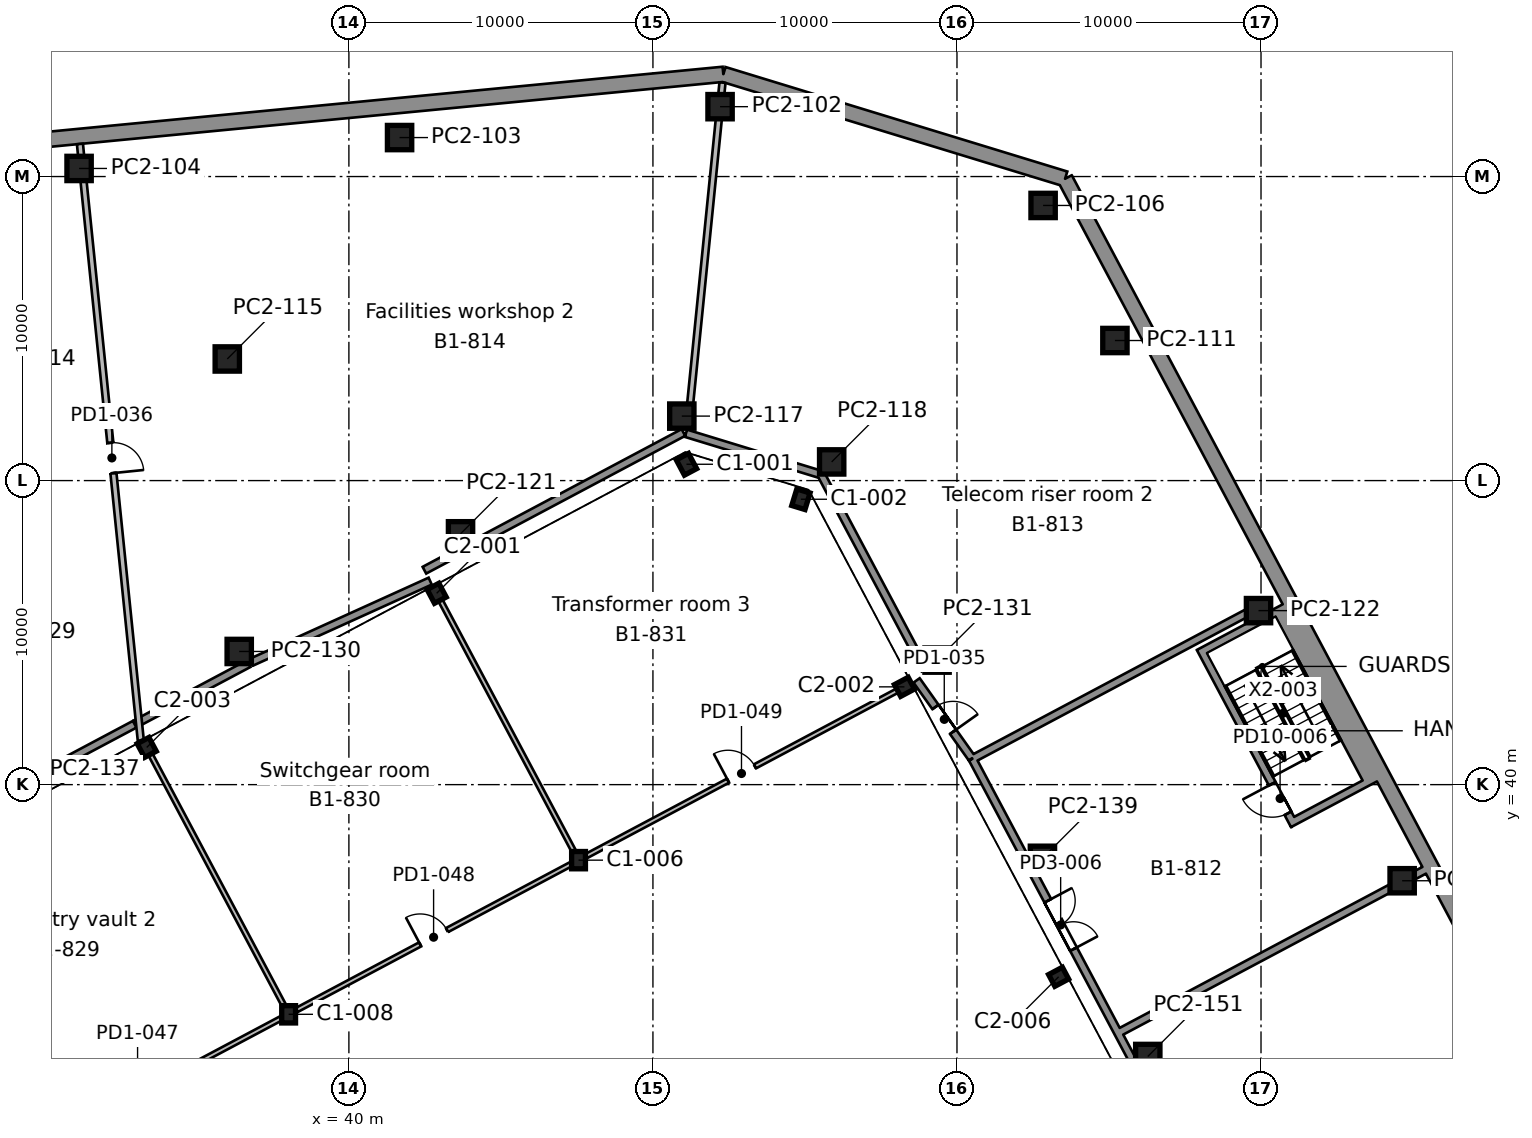
"""IFC4 building model, lengths in metres.
Left out: names, types, materials, properties, quantities, classifications, styles, units other than length and angle.
Written with IfcOpenShell. Run it as: python <this file> out.ifc"""

import sys

from ifc_helpers import new_model, si_unit, direction, frame, frame_2d, origin, origin_2d, place, context, subcontext, project, spatial, rectangle, i_section, extrude, element, fill, save


model = new_model("IFC4")
c1 = context("Model", 3, precision=1e-05, world=origin(), true_north=direction((0.0, 1.0)))
c2 = subcontext(c1, "Body", "Model", "MODEL_VIEW")
j1 = project(units=[si_unit("LENGTHUNIT", "METRE"), si_unit("PLANEANGLEUNIT", "RADIAN")], contexts=[c1])
p1 = place(None, origin())
s1 = spatial("IfcSite", under=j1, at=p1, CompositionType="ELEMENT")
p2 = place(p1, origin())
s2 = spatial("IfcBuilding", under=s1, at=p2, CompositionType="ELEMENT")
p3 = place(p2, frame((0.0, 0.0, -4.5)))
s3 = spatial("IfcBuildingStorey", under=s2, at=p3, CompositionType="ELEMENT", Elevation=-4.5)
p4 = place(p3, frame((38.018, 32.446, 0.0), z_axis=(0.0, 0.0, 1.0), x_axis=(1.0, 0.0, 0.0)))
e1 = element("IfcColumn", 1, at=p4, inside=s3, PredefinedType="COLUMN", context=c2, shape_type="SweptSolid", body=[
    extrude(i_section(OverallWidth=0.455, OverallDepth=0.569, WebThickness=0.078, FlangeThickness=0.125, FilletRadius=0.015, at=origin_2d()), origin(), (0.0, 0.0, 1.0), 4.5),
])
p5 = place(p3, frame((63.343, 33.68, 0.0), z_axis=(0.0, 0.0, 1.0), x_axis=(-0.469471562786, 0.882947592859, 0.0)))
e2 = element("IfcColumn", 2, at=p5, inside=s3, PredefinedType="COLUMN", context=c2, shape_type="SweptSolid", body=[
    extrude(i_section(OverallWidth=0.437, OverallDepth=0.513, WebThickness=0.061, FlangeThickness=0.097, FilletRadius=0.015, at=origin_2d()), origin(), (0.0, 0.0, 1.0), 4.5),
])
p6 = place(p3, frame((47.553, 37.516, 0.0), z_axis=(0.0, 0.0, 1.0), x_axis=(1.0, 0.0, 0.0)))
e3 = element("IfcColumn", 3, at=p6, inside=s3, PredefinedType="COLUMN", context=c2, shape_type="SweptSolid", body=[
    extrude(i_section(OverallWidth=0.455, OverallDepth=0.569, WebThickness=0.078, FlangeThickness=0.125, FilletRadius=0.015, at=origin_2d()), origin(), (0.0, 0.0, 1.0), 4.5),
])
for number, where, z_axis, x_axis in (
    (4, (33.351, 41.223, 0.0), (0.0, 0.0, 1.0), (-0.883, -0.469, 0.0)),
    (5, (58.272, 43.216, 0.0), (0.0, 0.0, 1.0), (-0.469, 0.883, 0.0)),
    (6, (42.887, 46.293, 0.0), (0.0, 0.0, 1.0), (-0.883, -0.469, 0.0)),
):
    element("IfcColumn", number, at=place(p3, frame(where, z_axis=z_axis, x_axis=x_axis)), inside=s3, PredefinedType="COLUMN", context=c2, shape_type="SweptSolid", body=[
        extrude(i_section(OverallWidth=0.437, OverallDepth=0.513, WebThickness=0.061, FlangeThickness=0.097, FilletRadius=0.015, at=origin_2d()), origin(), (0.0, 0.0, 1.0), 4.5),
    ])
for number, where, z_axis, x_axis in (
    (7, (54.867, 49.386, 0.0), (0.0, 0.0, 1.0), (-0.956, 0.292, 0.0)),
    (8, (51.103, 50.537, 0.0), (0.0, 0.0, 1.0), (-0.883, -0.469, 0.0)),
):
    element("IfcColumn", number, at=place(p3, frame(where, z_axis=z_axis, x_axis=x_axis)), inside=s3, PredefinedType="COLUMN", context=c2, shape_type="SweptSolid", body=[
        extrude(i_section(OverallWidth=0.455, OverallDepth=0.569, WebThickness=0.078, FlangeThickness=0.125, FilletRadius=0.015, at=origin_2d()), origin(), (0.0, 0.0, 1.0), 4.5),
    ])
p7 = place(p3, frame((85.221, 19.18, 0.0), z_axis=(0.0, 0.0, 1.0), x_axis=(-0.469470569953, 0.882948120757, 0.0)))
e9 = element("IfcWall", 9, at=p7, inside=s3, PredefinedType="SOLIDWALL", context=c2, shape_type="SweptSolid", body=[
    extrude(rectangle(XDim=46.148, YDim=0.5, at=frame_2d((23.074, 0.0))), origin(), (0.0, 0.0, 1.0), 4.5),
])
p8 = place(p3, frame((63.556, 59.926, 0.0), z_axis=(0.0, 0.0, 1.0), x_axis=(-0.956305605615, 0.292368925623, 0.0)))
e10 = element("IfcWall", 10, at=p8, inside=s3, PredefinedType="SOLIDWALL", context=c2, shape_type="SweptSolid", body=[
    extrude(rectangle(XDim=11.754, YDim=0.5, at=frame_2d((5.877, 0.0))), origin(), (0.0, 0.0, 1.0), 4.5),
])
p9 = place(p3, frame((52.315, 63.363, 0.0), z_axis=(0.0, 0.0, 1.0), x_axis=(-0.995387233017, -0.095938815644, 0.0)))
e11 = element("IfcWall", 11, at=p9, inside=s3, PredefinedType="SOLIDWALL", context=c2, shape_type="SweptSolid", body=[
    extrude(rectangle(XDim=95.624, YDim=0.5, at=frame_2d((47.812, 0.0))), origin(), (0.0, 0.0, 1.0), 4.5),
])
for number, where, z_axis, x_axis in (
    (12, (66.276, 31.059, 0.0), (0.0, 0.0, 1.0), (1.0, 0.0, 0.0)),
    (13, (74.642, 36.839, 0.0), (0.0, 0.0, 1.0), (1.0, 0.0, 0.0)),
    (14, (62.811, 37.577, 0.0), (0.0, 0.0, 1.0), (1.0, 0.0, 0.0)),
    (15, (59.345, 44.096, 0.0), (0.0, 0.0, 1.0), (1.0, 0.0, 0.0)),
    (16, (36.393, 44.38, 0.0), (0.0, 0.0, 1.0), (1.0, 0.0, 0.0)),
    (17, (69.918, 45.723, 0.0), (0.0, 0.0, 1.0), (1.0, 0.0, 0.0)),
    (18, (43.672, 48.25, 0.0), (0.0, 0.0, 1.0), (1.0, 0.0, 0.0)),
    (19, (55.879, 50.614, 0.0), (0.0, 0.0, 1.0), (1.0, 0.0, 0.0)),
    (20, (50.95, 52.121, 0.0), (0.0, 0.0, 1.0), (1.0, 0.0, 0.0)),
    (21, (36.0, 54.0, 0.0), (0.0, 0.0, 1.0), (1.0, 0.0, 0.0)),
    (22, (65.195, 54.607, 0.0), (0.0, 0.0, 1.0), (1.0, 0.0, 0.0)),
    (23, (62.833, 59.049, 0.0), (0.0, 0.0, 1.0), (1.0, 0.0, 0.0)),
    (24, (31.126, 60.266, 0.0), (0.0, 0.0, 1.0), (1.0, 0.0, 0.0)),
    (25, (41.667, 61.282, 0.0), (0.0, 0.0, 1.0), (1.0, 0.0, 0.0)),
    (26, (52.208, 62.298, 0.0), (0.0, 0.0, 1.0), (1.0, 0.0, 0.0)),
):
    element("IfcColumn", number, at=place(p3, frame(where, z_axis=z_axis, x_axis=x_axis)), inside=s3, PredefinedType="COLUMN", context=c2, shape_type="SweptSolid", body=[
        extrude(rectangle(XDim=0.8, YDim=0.8, at=origin_2d()), origin(), (0.0, 0.0, 1.0), 4.05),
    ])
p10 = place(p3, frame((75.366, 37.182, 0.0), z_axis=(0.0, 0.0, 1.0), x_axis=(-0.882960484464, -0.4694473164, 0.0)))
e27 = element("IfcWall", 27, at=p10, inside=s3, PredefinedType="SOLIDWALL", context=c2, shape_type="SweptSolid", body=[
    extrude(rectangle(XDim=0.367, YDim=0.25, at=frame_2d((0.183, 0.0))), origin(), (0.0, 0.0, 1.0), 4.05),
])
p11 = place(p3, frame((74.242, 36.585, 0.0), z_axis=(0.0, 0.0, 1.0), x_axis=(-0.882936179938, -0.469493026738, 0.0)))
e28 = element("IfcWall", 28, at=p11, inside=s3, PredefinedType="SOLIDWALL", context=c2, shape_type="SweptSolid", body=[
    extrude(rectangle(XDim=10.127, YDim=0.25, at=frame_2d((5.063, 0.0))), origin(), (0.0, 0.0, 1.0), 4.05),
])
p12 = place(p3, frame((65.303, 31.825, 0.0), z_axis=(0.0, 0.0, 1.0), x_axis=(0.46947695358, -0.882944726502, 0.0)))
e29 = element("IfcWall", 29, at=p12, inside=s3, PredefinedType="SOLIDWALL", context=c2, shape_type="SweptSolid", body=[
    extrude(rectangle(XDim=1.22, YDim=0.25, at=frame_2d((0.61, 0.0))), origin(), (0.0, 0.0, 1.0), 4.05),
])
p13 = place(p3, frame((69.518, 45.635, 0.0), z_axis=(0.0, 0.0, 1.0), x_axis=(-0.882956154604, -0.46945546013, 0.0)))
e30 = element("IfcWall", 30, at=p13, inside=s3, PredefinedType="SOLIDWALL", context=c2, shape_type="SweptSolid", body=[
    extrude(rectangle(XDim=10.206, YDim=0.25, at=frame_2d((5.103, 0.0))), origin(), (0.0, 0.0, 1.0), 4.05),
])
p14 = place(p3, frame((60.505, 40.848, 0.0), z_axis=(0.0, 0.0, 1.0), x_axis=(0.469448377302, -0.882959920409, 0.0)))
e31 = element("IfcWall", 31, at=p14, inside=s3, PredefinedType="SOLIDWALL", context=c2, shape_type="SweptSolid", body=[
    extrude(rectangle(XDim=4.059, YDim=0.25, at=frame_2d((2.03, 0.0))), origin(), (0.0, 0.0, 1.0), 4.05),
])
p15 = place(p3, frame((62.457, 37.177, 0.0), z_axis=(0.0, 0.0, 1.0), x_axis=(0.469458615732, -0.882954476808, 0.0)))
e32 = element("IfcWall", 32, at=p15, inside=s3, PredefinedType="SOLIDWALL", context=c2, shape_type="SweptSolid", body=[
    extrude(rectangle(XDim=6.06, YDim=0.25, at=frame_2d((3.03, 0.0))), origin(), (0.0, 0.0, 1.0), 4.05),
])
p16 = place(p15, frame((1.13, 0.0, 0.0)))
e33 = element("IfcOpeningElement", 33, at=p16, cuts=e32, PredefinedType="OPENING", context=c2, shape_type="SweptSolid", body=[
    extrude(rectangle(XDim=1.8, YDim=2.1, at=frame_2d((0.9, 1.05))), frame((0.0, 0.135, 0.0), z_axis=(0.0, -1.0, 0.0), x_axis=(1.0, 0.0, 0.0)), (0.0, 0.0, 1.0), 0.27),
])
p17 = place(p3, frame((52.288, 63.089, 0.0), z_axis=(0.0, 0.0, 1.0), x_axis=(-0.099933903019, -0.994994077886, 0.0)))
e34 = element("IfcWall", 34, at=p17, inside=s3, PredefinedType="PARTITIONING", context=c2, shape_type="SweptSolid", body=[
    extrude(rectangle(XDim=0.393, YDim=0.2, at=frame_2d((0.197, 0.0))), origin(), (0.0, 0.0, 1.0), 4.05),
])
p18 = place(p3, frame((52.168, 61.898, 0.0), z_axis=(0.0, 0.0, 1.0), x_axis=(-0.100124403506, -0.994974926228, 0.0)))
e35 = element("IfcWall", 35, at=p18, inside=s3, PredefinedType="PARTITIONING", context=c2, shape_type="SweptSolid", body=[
    extrude(rectangle(XDim=9.424, YDim=0.2, at=frame_2d((4.712, 0.0))), origin(), (0.0, 0.0, 1.0), 4.05),
])
p19 = place(p3, frame((58.672, 43.428, 0.0), z_axis=(0.0, 0.0, 1.0), x_axis=(0.578928632739, -0.815378217881, 0.0)))
e36 = element("IfcWall", 36, at=p19, inside=s3, PredefinedType="SOLIDWALL", context=c2, shape_type="SweptSolid", body=[
    extrude(rectangle(XDim=3.143, YDim=0.25, at=frame_2d((1.572, 0.0))), origin(), (0.0, 0.0, 1.0), 4.05),
])
p20 = place(p19, frame((1.072, 0.0, 0.0)))
e37 = element("IfcOpeningElement", 37, at=p20, cuts=e36, PredefinedType="OPENING", context=c2, shape_type="SweptSolid", body=[
    extrude(rectangle(XDim=1.0, YDim=2.1, at=frame_2d((0.5, 1.05))), frame((0.0, 0.135, 0.0), z_axis=(0.0, -1.0, 0.0), x_axis=(1.0, 0.0, 0.0)), (0.0, 0.0, 1.0), 0.27),
])
p21 = place(p3, frame((51.087, 51.556, 0.0), z_axis=(0.0, 0.0, 1.0), x_axis=(0.956310816829, -0.292351879788, 0.0)))
e38 = element("IfcWall", 38, at=p21, inside=s3, PredefinedType="SOLIDWALL", context=c2, shape_type="SweptSolid", body=[
    extrude(rectangle(XDim=4.651, YDim=0.25, at=frame_2d((2.326, 0.0))), origin(), (0.0, 0.0, 1.0), 4.05),
])
p22 = place(p3, frame((55.535, 50.196, 0.0), z_axis=(0.0, 0.0, 1.0), x_axis=(0.469471385401, -0.882947687176, 0.0)))
e39 = element("IfcWall", 39, at=p22, inside=s3, PredefinedType="SOLIDWALL", context=c2, shape_type="SweptSolid", body=[
    extrude(rectangle(XDim=7.264, YDim=0.25, at=frame_2d((3.632, 0.0))), origin(), (0.0, 0.0, 1.0), 4.05),
])
p23 = place(p3, frame((31.155, 61.072, 0.0), z_axis=(0.0, 0.0, 1.0), x_axis=(0.095769432991, -0.995403544149, 0.0)))
e40 = element("IfcWall", 40, at=p23, inside=s3, PredefinedType="PARTITIONING", context=c2, shape_type="SweptSolid", body=[
    extrude(rectangle(XDim=0.408, YDim=0.2, at=frame_2d((0.204, 0.0))), origin(), (0.0, 0.0, 1.0), 4.05),
])
p24 = place(p3, frame((31.271, 59.866, 0.0), z_axis=(0.0, 0.0, 1.0), x_axis=(0.10182537806, -0.994802288087, 0.0)))
e41 = element("IfcWall", 41, at=p24, inside=s3, PredefinedType="PARTITIONING", context=c2, shape_type="SweptSolid", body=[
    extrude(rectangle(XDim=18.51, YDim=0.2, at=frame_2d((9.255, 0.0))), origin(), (0.0, 0.0, 1.0), 4.05),
])
p25 = place(p24, frame((8.669, 0.0, 0.0)))
e42 = element("IfcOpeningElement", 42, at=p25, cuts=e41, PredefinedType="OPENING", context=c2, shape_type="SweptSolid", body=[
    extrude(rectangle(XDim=1.0, YDim=2.1, at=frame_2d((0.5, 1.05))), frame((0.0, 0.11, 0.0), z_axis=(0.0, -1.0, 0.0), x_axis=(1.0, 0.0, 0.0)), (0.0, 0.0, 1.0), 0.22),
])
p26 = place(p3, frame((32.989, 42.004, 0.0), z_axis=(0.0, 0.0, 1.0), x_axis=(0.882952706143, 0.469461945971, 0.0)))
e43 = element("IfcWall", 43, at=p26, inside=s3, PredefinedType="SOLIDWALL", context=c2, shape_type="SweptSolid", body=[
    extrude(rectangle(XDim=4.209, YDim=0.25, at=frame_2d((2.104, 0.0))), origin(), (0.0, 0.0, 1.0), 4.05),
])
p27 = place(p3, frame((36.793, 44.027, 0.0), z_axis=(0.0, 0.0, 1.0), x_axis=(0.910758391685, 0.412939646892, 0.0)))
e44 = element("IfcWall", 44, at=p27, inside=s3, PredefinedType="SOLIDWALL", context=c2, shape_type="SweptSolid", body=[
    extrude(rectangle(XDim=6.457, YDim=0.25, at=frame_2d((3.229, 0.0))), origin(), (0.0, 0.0, 1.0), 4.05),
])
p28 = place(p3, frame((42.483, 47.052, 0.0), z_axis=(0.0, 0.0, 1.0), x_axis=(0.882940813988, 0.469484311766, 0.0)))
e45 = element("IfcWall", 45, at=p28, inside=s3, PredefinedType="SOLIDWALL", context=c2, shape_type="SweptSolid", body=[
    extrude(rectangle(XDim=1.699, YDim=0.25, at=frame_2d((0.85, 0.0))), origin(), (0.0, 0.0, 1.0), 4.05),
])
p29 = place(p3, frame((44.072, 47.897, 0.0), z_axis=(0.0, 0.0, 1.0), x_axis=(0.882948932855, 0.469469042612, 0.0)))
e46 = element("IfcWall", 46, at=p29, inside=s3, PredefinedType="SOLIDWALL", context=c2, shape_type="SweptSolid", body=[
    extrude(rectangle(XDim=7.849, YDim=0.25, at=frame_2d((3.924, 0.0))), origin(), (0.0, 0.0, 1.0), 4.05),
])
p30 = place(p3, frame((29.514, 40.156, 0.0), z_axis=(0.0, 0.0, 1.0), x_axis=(0.882952549127, 0.469462241283, 0.0)))
e47 = element("IfcWall", 47, at=p30, inside=s3, PredefinedType="SOLIDWALL", context=c2, shape_type="SweptSolid", body=[
    extrude(rectangle(XDim=3.895, YDim=0.25, at=frame_2d((1.948, 0.0))), origin(), (0.0, 0.0, 1.0), 4.05),
])
p31 = place(p3, frame((37.755, 32.307, 0.0), z_axis=(0.0, 0.0, 1.0), x_axis=(-0.882947426762, -0.469471875169, 0.0)))
e48 = element("IfcWall", 48, at=p31, inside=s3, PredefinedType="PARTITIONING", context=c2, shape_type="SweptSolid", body=[
    extrude(rectangle(XDim=10.503, YDim=0.15, at=frame_2d((5.251, 0.0))), origin(), (0.0, 0.0, 1.0), 4.05),
])
p32 = place(p31, frame((4.83, 0.0, 0.0)))
e49 = element("IfcOpeningElement", 49, at=p32, cuts=e48, PredefinedType="OPENING", context=c2, shape_type="SweptSolid", body=[
    extrude(rectangle(XDim=1.0, YDim=2.1, at=frame_2d((0.5, 1.05))), frame((0.0, 0.085, 0.0), z_axis=(0.0, -1.0, 0.0), x_axis=(1.0, 0.0, 0.0)), (0.0, 0.0, 1.0), 0.17),
])
p33 = place(p3, frame((47.291, 37.376, 0.0), z_axis=(0.0, 0.0, 1.0), x_axis=(-0.88295489766, -0.469457824194, 0.0)))
e50 = element("IfcWall", 50, at=p33, inside=s3, PredefinedType="PARTITIONING", context=c2, shape_type="SweptSolid", body=[
    extrude(rectangle(XDim=10.204, YDim=0.15, at=frame_2d((5.102, 0.0))), origin(), (0.0, 0.0, 1.0), 4.05),
])
p34 = place(p33, frame((4.602, 0.0, 0.0)))
e51 = element("IfcOpeningElement", 51, at=p34, cuts=e50, PredefinedType="OPENING", context=c2, shape_type="SweptSolid", body=[
    extrude(rectangle(XDim=1.0, YDim=2.1, at=frame_2d((0.5, 1.05))), frame((0.0, 0.085, 0.0), z_axis=(0.0, -1.0, 0.0), x_axis=(1.0, 0.0, 0.0)), (0.0, 0.0, 1.0), 0.17),
])
p35 = place(p3, frame((58.046, 43.095, 0.0), z_axis=(0.0, 0.0, 1.0), x_axis=(-0.882944872937, -0.469476678179, 0.0)))
e52 = element("IfcWall", 52, at=p35, inside=s3, PredefinedType="PARTITIONING", context=c2, shape_type="SweptSolid", body=[
    extrude(rectangle(XDim=11.586, YDim=0.15, at=frame_2d((5.793, 0.0))), origin(), (0.0, 0.0, 1.0), 4.05),
])
p36 = place(p35, frame((5.314, 0.0, 0.0)))
e53 = element("IfcOpeningElement", 53, at=p36, cuts=e52, PredefinedType="OPENING", context=c2, shape_type="SweptSolid", body=[
    extrude(rectangle(XDim=1.0, YDim=2.1, at=frame_2d((0.5, 1.05))), frame((0.0, 0.085, 0.0), z_axis=(0.0, -1.0, 0.0), x_axis=(1.0, 0.0, 0.0)), (0.0, 0.0, 1.0), 0.17),
])
p37 = place(p3, frame((37.85, 32.762, 0.0), z_axis=(0.0, 0.0, 1.0), x_axis=(-0.469481854544, 0.882942120557, 0.0)))
e54 = element("IfcWall", 54, at=p37, inside=s3, PredefinedType="PARTITIONING", context=c2, shape_type="SweptSolid", body=[
    extrude(rectangle(XDim=9.326, YDim=0.15, at=frame_2d((4.663, 0.0))), origin(), (0.0, 0.0, 1.0), 4.05),
])
p38 = place(p3, frame((47.385, 37.832, 0.0), z_axis=(0.0, 0.0, 1.0), x_axis=(-0.469472297485, 0.882947202212, 0.0)))
e55 = element("IfcWall", 55, at=p38, inside=s3, PredefinedType="PARTITIONING", context=c2, shape_type="SweptSolid", body=[
    extrude(rectangle(XDim=9.326, YDim=0.15, at=frame_2d((4.663, 0.0))), origin(), (0.0, 0.0, 1.0), 4.05),
])
p39 = place(p3, frame((73.4, 40.027, 0.0), z_axis=(0.0, 0.0, 1.0), x_axis=(-0.882970050864, -0.469429322983, 0.0)))
e56 = element("IfcWall", 56, at=p39, inside=s3, PredefinedType="SOLIDWALL", context=c2, shape_type="SweptSolid", body=[
    extrude(rectangle(XDim=2.8, YDim=0.25, at=frame_2d((1.4, 0.0))), origin(), (0.0, 0.0, 1.0), 4.05),
])
p40 = place(p3, frame((70.419, 45.633, 0.0), z_axis=(0.0, 0.0, 1.0), x_axis=(-0.882950835185, -0.469465464807, 0.0)))
e57 = element("IfcWall", 57, at=p40, inside=s3, PredefinedType="SOLIDWALL", context=c2, shape_type="SweptSolid", body=[
    extrude(rectangle(XDim=2.8, YDim=0.25, at=frame_2d((1.4, 0.0))), origin(), (0.0, 0.0, 1.0), 4.05),
])
p41 = place(p3, frame((71.097, 38.66, 0.0), z_axis=(0.0, 0.0, 1.0), x_axis=(-0.469489660743, 0.882937969766, 0.0)))
e58 = element("IfcWall", 58, at=p41, inside=s3, PredefinedType="SOLIDWALL", context=c2, shape_type="SweptSolid", body=[
    extrude(rectangle(XDim=6.6, YDim=0.25, at=frame_2d((3.3, 0.0))), origin(), (0.0, 0.0, 1.0), 4.05),
])
p42 = place(p41, frame((0.45, 0.0, 0.0)))
e59 = element("IfcOpeningElement", 59, at=p42, cuts=e58, PredefinedType="OPENING", context=c2, shape_type="SweptSolid", body=[
    extrude(rectangle(XDim=1.1, YDim=2.1, at=frame_2d((0.55, 1.05))), frame((0.0, 0.135, 0.0), z_axis=(0.0, -1.0, 0.0), x_axis=(1.0, 0.0, 0.0)), (0.0, 0.0, 1.0), 0.27),
])
p43 = place(p3, frame((73.635, 40.01, 0.0), z_axis=(0.0, 0.0, 1.0), x_axis=(-0.469445489529, 0.882961455761, 0.0)))
e60 = element("IfcWall", 60, at=p43, inside=s3, PredefinedType="SOLIDWALL", context=c2, shape_type="SweptSolid", body=[
    extrude(rectangle(XDim=6.6, YDim=0.4, at=frame_2d((3.3, 0.0))), origin(), (0.0, 0.0, 1.0), 4.05),
])
p44 = place(p42, origin())
e61 = element("IfcDoor", 61, at=p44, inside=s3, OperationType="SINGLE_SWING_RIGHT", PredefinedType="DOOR", context=c2, shape_type="SweptSolid", body=[
    extrude(rectangle(XDim=1.1, YDim=2.1, at=frame_2d((0.55, 1.05))), frame((0.0, 0.025, 0.0), z_axis=(0.0, -1.0, 0.0), x_axis=(1.0, 0.0, 0.0)), (0.0, 0.0, 1.0), 0.05),
])
fill(e59, e61)
p45 = place(p36, frame((1.0, 0.0, 0.0), z_axis=(0.0, 0.0, 1.0), x_axis=(-1.0, 0.0, 0.0)))
e62 = element("IfcDoor", 62, at=p45, inside=s3, OperationType="SINGLE_SWING_LEFT", PredefinedType="DOOR", context=c2, shape_type="SweptSolid", body=[
    extrude(rectangle(XDim=1.0, YDim=2.1, at=frame_2d((0.5, 1.05))), frame((0.0, 0.025, 0.0), z_axis=(0.0, -1.0, 0.0), x_axis=(1.0, 0.0, 0.0)), (0.0, 0.0, 1.0), 0.05),
])
fill(e53, e62)
p46 = place(p34, frame((1.0, 0.0, 0.0), z_axis=(0.0, 0.0, 1.0), x_axis=(-1.0, 0.0, 0.0)))
e63 = element("IfcDoor", 63, at=p46, inside=s3, OperationType="SINGLE_SWING_LEFT", PredefinedType="DOOR", context=c2, shape_type="SweptSolid", body=[
    extrude(rectangle(XDim=1.0, YDim=2.1, at=frame_2d((0.5, 1.05))), frame((0.0, 0.025, 0.0), z_axis=(0.0, -1.0, 0.0), x_axis=(1.0, 0.0, 0.0)), (0.0, 0.0, 1.0), 0.05),
])
fill(e51, e63)
p47 = place(p16, origin())
e64 = element("IfcDoor", 64, at=p47, inside=s3, OperationType="DOUBLE_DOOR_SINGLE_SWING", PredefinedType="DOOR", context=c2, shape_type="SweptSolid", body=[
    extrude(rectangle(XDim=1.8, YDim=2.1, at=frame_2d((0.9, 1.05))), frame((0.0, 0.025, 0.0), z_axis=(0.0, -1.0, 0.0), x_axis=(1.0, 0.0, 0.0)), (0.0, 0.0, 1.0), 0.05),
])
fill(e33, e64)
p48 = place(p20, origin())
e65 = element("IfcDoor", 65, at=p48, inside=s3, OperationType="SINGLE_SWING_RIGHT", PredefinedType="DOOR", context=c2, shape_type="SweptSolid", body=[
    extrude(rectangle(XDim=1.0, YDim=2.1, at=frame_2d((0.5, 1.05))), frame((0.0, 0.025, 0.0), z_axis=(0.0, -1.0, 0.0), x_axis=(1.0, 0.0, 0.0)), (0.0, 0.0, 1.0), 0.05),
])
fill(e37, e65)
p49 = place(p25, origin())
e66 = element("IfcDoor", 66, at=p49, inside=s3, OperationType="SINGLE_SWING_RIGHT", PredefinedType="DOOR", context=c2, shape_type="SweptSolid", body=[
    extrude(rectangle(XDim=1.0, YDim=2.1, at=frame_2d((0.5, 1.05))), frame((0.0, 0.025, 0.0), z_axis=(0.0, -1.0, 0.0), x_axis=(1.0, 0.0, 0.0)), (0.0, 0.0, 1.0), 0.05),
])
fill(e42, e66)
save(model, sys.argv[1])
